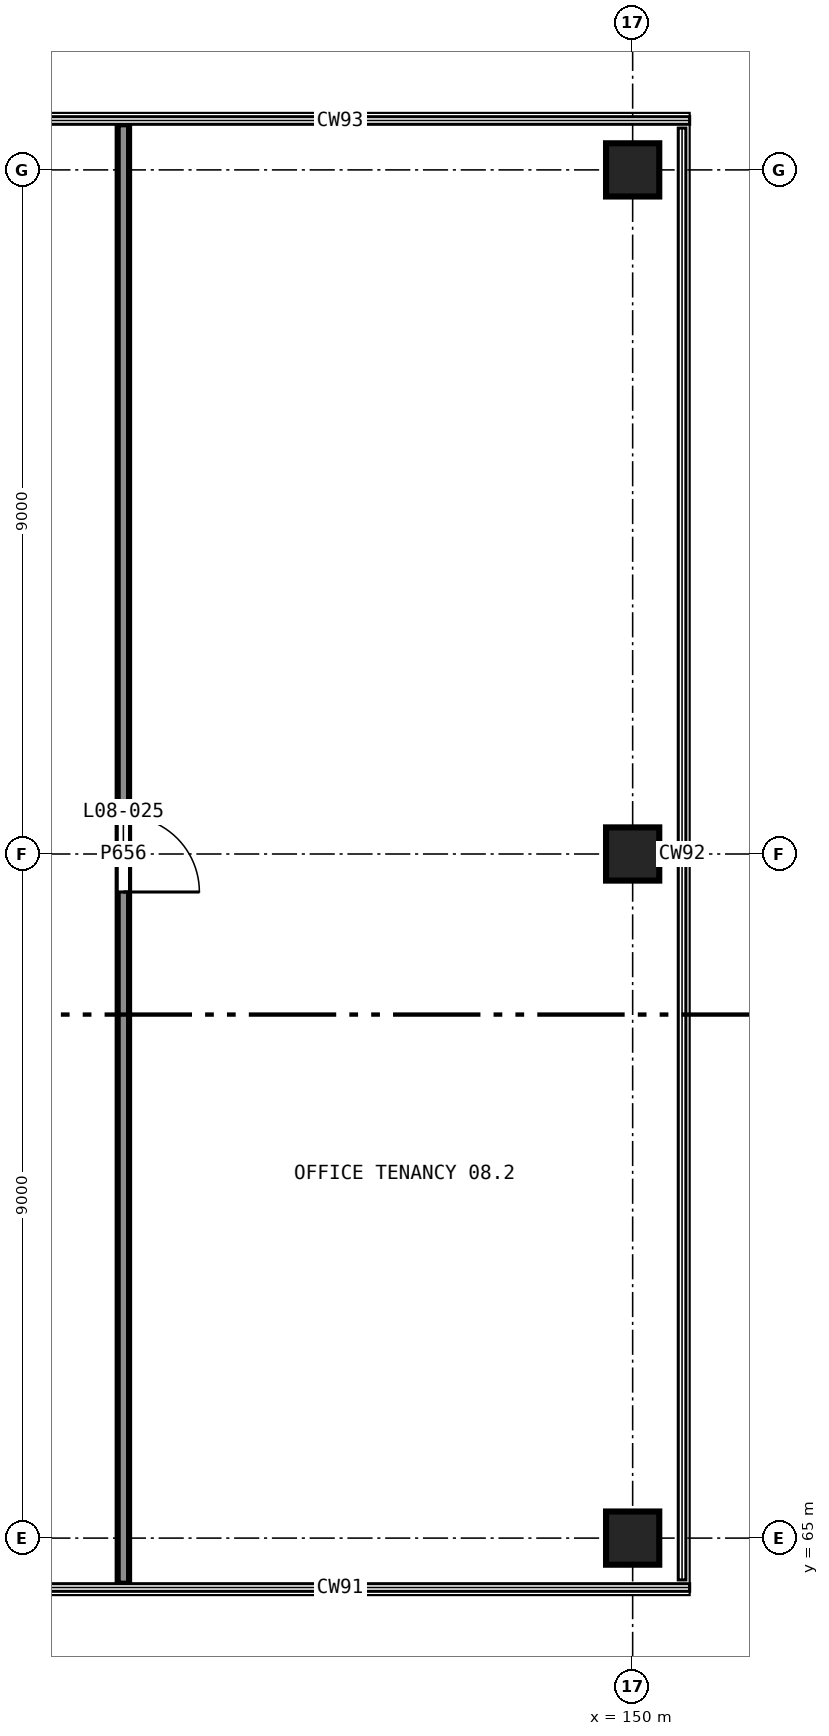
"""IFC4 building model, lengths in metres.
Left out: names, types, materials, properties, quantities, classifications, styles, units other than length and angle.
Written with IfcOpenShell. Run it as: python <this file> out.ifc"""

import sys

from ifc_helpers import new_model, si_unit, direction, frame, frame_2d, origin, origin_2d, place, context, subcontext, project, spatial, rectangle, extrude, element, fill, save


model = new_model("IFC4")
c1 = context("Model", 3, precision=1e-05, world=origin(), true_north=direction((0.0, 1.0)))
c2 = subcontext(c1, "Body", "Model", "MODEL_VIEW")
j1 = project(units=[si_unit("LENGTHUNIT", "METRE"), si_unit("PLANEANGLEUNIT", "RADIAN")], contexts=[c1])
p1 = place(None, origin())
s1 = spatial("IfcSite", under=j1, at=p1, CompositionType="ELEMENT")
p2 = place(p1, origin())
s2 = spatial("IfcBuilding", under=s1, at=p2, CompositionType="ELEMENT")
p3 = place(p2, frame((0.0, 0.0, 33.5)))
s3 = spatial("IfcBuildingStorey", under=s2, at=p3, CompositionType="ELEMENT", Elevation=33.5)
for number, where, z_axis, x_axis in (
    (1, (150.0, 65.0, 0.0), (0.0, 0.0, 1.0), (1.0, 0.0, 0.0)),
    (2, (150.0, 74.0, 0.0), (0.0, 0.0, 1.0), (1.0, 0.0, 0.0)),
    (3, (150.0, 83.0, 0.0), (0.0, 0.0, 1.0), (1.0, 0.0, 0.0)),
):
    element("IfcColumn", number, at=place(p3, frame(where, z_axis=z_axis, x_axis=x_axis)), inside=s3, PredefinedType="COLUMN", context=c2, shape_type="SweptSolid", body=[
        extrude(rectangle(XDim=0.7, YDim=0.7, at=origin_2d()), origin(), (0.0, 0.0, 1.0), 4.0),
    ])
p4 = place(p3, frame((143.3, 83.6, 0.0), z_axis=(0.0, 0.0, 1.0), x_axis=(0.0, -1.0, 0.0)))
e4 = element("IfcWall", 4, at=p4, inside=s3, PredefinedType="PARTITIONING", context=c2, shape_type="SweptSolid", body=[
    extrude(rectangle(XDim=19.2, YDim=0.15, at=frame_2d((9.6, 0.0))), origin(), (0.0, 0.0, 1.0), 3.75),
])
p5 = place(p4, frame((9.1, 0.0, 0.0)))
e5 = element("IfcOpeningElement", 5, at=p5, cuts=e4, PredefinedType="OPENING", context=c2, shape_type="SweptSolid", body=[
    extrude(rectangle(XDim=1.0, YDim=2.1, at=frame_2d((0.5, 1.05))), frame((0.0, 0.085, 0.0), z_axis=(0.0, -1.0, 0.0), x_axis=(1.0, 0.0, 0.0)), (0.0, 0.0, 1.0), 0.17),
])
p6 = place(p5, origin())
e6 = element("IfcDoor", 6, at=p6, inside=s3, OperationType="SINGLE_SWING_LEFT", PredefinedType="DOOR", context=c2, shape_type="SweptSolid", body=[
    extrude(rectangle(XDim=1.0, YDim=2.1, at=frame_2d((0.5, 1.05))), frame((0.0, 0.025, 0.0), z_axis=(0.0, -1.0, 0.0), x_axis=(1.0, 0.0, 0.0)), (0.0, 0.0, 1.0), 0.05),
])
fill(e5, e6)
save(model, sys.argv[1])
